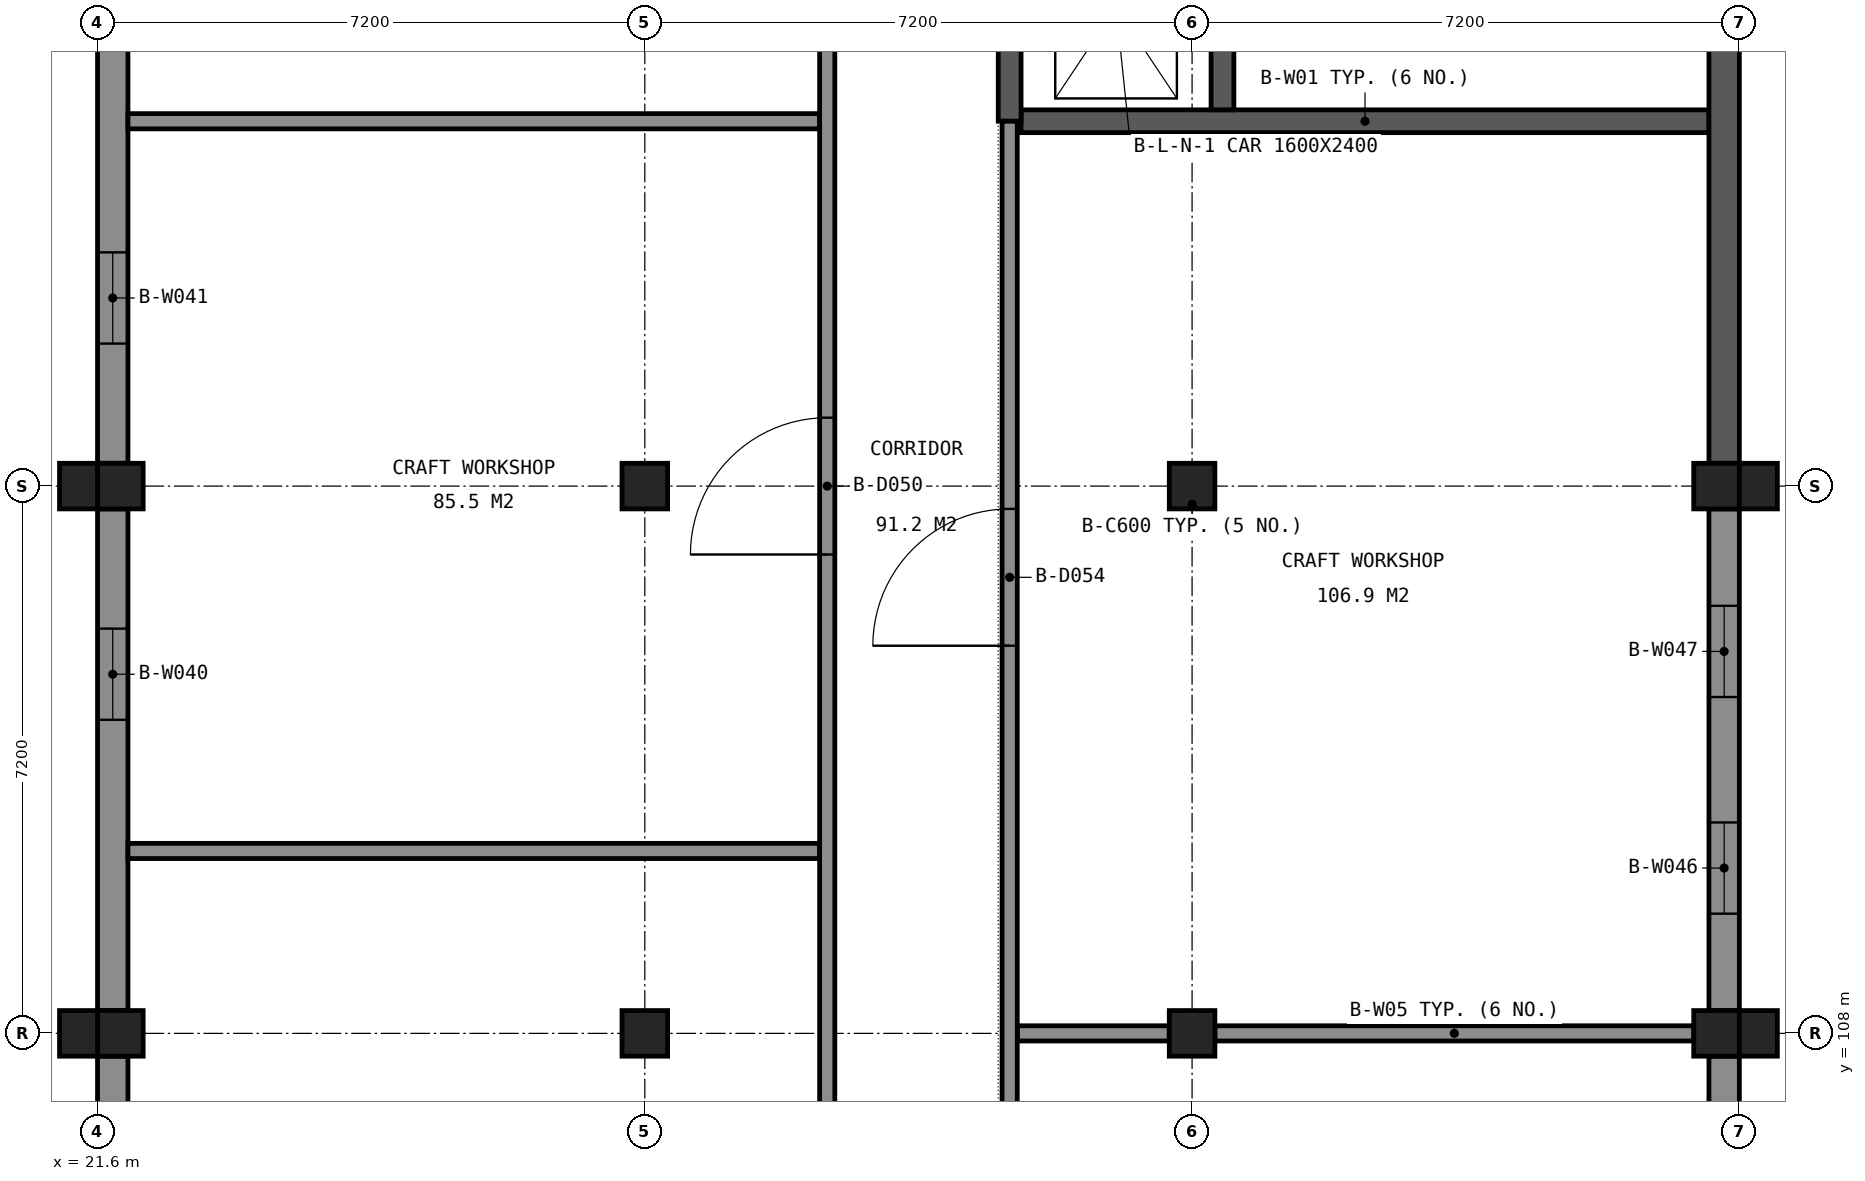
"""IFC4 building model, lengths in metres.
Left out: names, types, materials, properties, quantities, classifications, styles, units other than length and angle.
Written with IfcOpenShell. Run it as: python <this file> out.ifc"""

import sys

from ifc_helpers import new_model, si_unit, direction, frame, frame_2d, origin, origin_2d, place, context, subcontext, project, spatial, rectangle, extrude, element, fill, save


model = new_model("IFC4")
c1 = context("Model", 3, precision=1e-05, world=origin(), true_north=direction((0.0, 1.0)))
c2 = subcontext(c1, "Body", "Model", "MODEL_VIEW")
j1 = project(units=[si_unit("LENGTHUNIT", "METRE"), si_unit("PLANEANGLEUNIT", "RADIAN")], contexts=[c1])
p1 = place(None, origin())
s1 = spatial("IfcSite", under=j1, at=p1, CompositionType="ELEMENT")
p2 = place(p1, origin())
s2 = spatial("IfcBuilding", under=s1, at=p2, CompositionType="ELEMENT")
p3 = place(p2, frame((0.0, 0.0, 9.6)))
s3 = spatial("IfcBuildingStorey", under=s2, at=p3, CompositionType="ELEMENT", Elevation=9.6)
for number, where, z_axis, x_axis in (
    (1, (21.9, 115.2, 0.0), (0.0, 0.0, 1.0), (1.0, 0.0, 0.0)),
    (2, (21.9, 108.0, 0.0), (0.0, 0.0, 1.0), (1.0, 0.0, 0.0)),
    (3, (28.8, 115.2, 0.0), (0.0, 0.0, 1.0), (1.0, 0.0, 0.0)),
    (4, (28.8, 108.0, 0.0), (0.0, 0.0, 1.0), (1.0, 0.0, 0.0)),
    (5, (36.0, 115.2, 0.0), (0.0, 0.0, 1.0), (1.0, 0.0, 0.0)),
    (6, (36.0, 108.0, 0.0), (0.0, 0.0, 1.0), (1.0, 0.0, 0.0)),
    (7, (42.9, 115.2, 0.0), (0.0, 0.0, 1.0), (1.0, 0.0, 0.0)),
    (8, (42.9, 108.0, 0.0), (0.0, 0.0, 1.0), (1.0, 0.0, 0.0)),
):
    element("IfcColumn", number, at=place(p3, frame(where, z_axis=z_axis, x_axis=x_axis)), inside=s3, PredefinedType="COLUMN", context=c2, shape_type="SweptSolid", body=[
        extrude(rectangle(XDim=0.6, YDim=0.6, at=origin_2d()), origin(), (0.0, 0.0, 1.0), 4.8),
    ])
p4 = place(p3, frame((33.75, 120.0, 0.0), z_axis=(0.0, 0.0, 1.0), x_axis=(1.0, 0.0, 0.0)))
e9 = element("IfcWall", 9, at=p4, inside=s3, PredefinedType="SHEAR", context=c2, shape_type="SweptSolid", body=[
    extrude(rectangle(XDim=9.05, YDim=0.3, at=frame_2d((4.525, 0.0))), origin(), (0.0, 0.0, 1.0), 4.55),
])
p5 = place(p3, frame((33.6, 120.0, 0.0), z_axis=(0.0, 0.0, 1.0), x_axis=(0.0, 1.0, 0.0)))
e10 = element("IfcWall", 10, at=p5, inside=s3, PredefinedType="SHEAR", context=c2, shape_type="SweptSolid", body=[
    extrude(rectangle(XDim=9.2, YDim=0.3, at=frame_2d((4.6, 0.0))), origin(), (0.0, 0.0, 1.0), 4.55),
])
p6 = place(p5, frame((4.0, 0.0, 0.0)))
e11 = element("IfcOpeningElement", 11, at=p6, cuts=e10, PredefinedType="OPENING", context=c2, shape_type="SweptSolid", body=[
    extrude(rectangle(XDim=1.2, YDim=2.1, at=frame_2d((0.6, 1.05))), frame((0.0, 0.16, 0.0), z_axis=(0.0, -1.0, 0.0), x_axis=(1.0, 0.0, 0.0)), (0.0, 0.0, 1.0), 0.32),
])
p7 = place(p5, frame((7.45, 0.0, 0.0)))
e12 = element("IfcOpeningElement", 12, at=p7, cuts=e10, PredefinedType="OPENING", context=c2, shape_type="SweptSolid", body=[
    extrude(rectangle(XDim=0.9, YDim=2.1, at=frame_2d((0.45, 1.05))), frame((0.0, 0.16, 0.0), z_axis=(0.0, -1.0, 0.0), x_axis=(1.0, 0.0, 0.0)), (0.0, 0.0, 1.0), 0.32),
])
p8 = place(p3, frame((36.4, 120.15, 0.0), z_axis=(0.0, 0.0, 1.0), x_axis=(0.0, 1.0, 0.0)))
e13 = element("IfcWall", 13, at=p8, inside=s3, PredefinedType="SHEAR", context=c2, shape_type="SweptSolid", body=[
    extrude(rectangle(XDim=2.7, YDim=0.3, at=frame_2d((1.35, 0.0))), origin(), (0.0, 0.0, 1.0), 4.55),
])
p9 = place(p3, frame((43.0, 115.5, 0.0), z_axis=(0.0, 0.0, 1.0), x_axis=(0.0, 1.0, 0.0)))
e14 = element("IfcWall", 14, at=p9, inside=s3, PredefinedType="SHEAR", context=c2, shape_type="SweptSolid", body=[
    extrude(rectangle(XDim=14.1, YDim=0.4, at=frame_2d((7.05, 0.0))), origin(), (0.0, 0.0, 1.0), 4.55),
])
p10 = place(p3, frame((21.8, 101.1, 0.0), z_axis=(0.0, 0.0, 1.0), x_axis=(0.0, 1.0, 0.0)))
e15 = element("IfcWall", 15, at=p10, inside=s3, PredefinedType="SOLIDWALL", context=c2, shape_type="SweptSolid", body=[
    extrude(rectangle(XDim=6.6, YDim=0.4, at=frame_2d((3.3, 0.0))), origin(), (0.0, 0.0, 1.0), 3.95),
])
p11 = place(p10, frame((1.275, 0.0, 0.9)))
e16 = element("IfcOpeningElement", 16, at=p11, cuts=e15, PredefinedType="OPENING", context=c2, shape_type="SweptSolid", body=[
    extrude(rectangle(XDim=1.2, YDim=2.4, at=frame_2d((0.6, 1.2))), frame((0.0, 0.21, 0.0), z_axis=(0.0, -1.0, 0.0), x_axis=(1.0, 0.0, 0.0)), (0.0, 0.0, 1.0), 0.42),
])
p12 = place(p10, frame((4.125, 0.0, 0.9)))
e17 = element("IfcOpeningElement", 17, at=p12, cuts=e15, PredefinedType="OPENING", context=c2, shape_type="SweptSolid", body=[
    extrude(rectangle(XDim=1.2, YDim=2.4, at=frame_2d((0.6, 1.2))), frame((0.0, 0.21, 0.0), z_axis=(0.0, -1.0, 0.0), x_axis=(1.0, 0.0, 0.0)), (0.0, 0.0, 1.0), 0.42),
])
p13 = place(p3, frame((21.8, 108.3, 0.0), z_axis=(0.0, 0.0, 1.0), x_axis=(0.0, 1.0, 0.0)))
e18 = element("IfcWall", 18, at=p13, inside=s3, PredefinedType="SOLIDWALL", context=c2, shape_type="SweptSolid", body=[
    extrude(rectangle(XDim=6.6, YDim=0.4, at=frame_2d((3.3, 0.0))), origin(), (0.0, 0.0, 1.0), 3.95),
])
p14 = place(p13, frame((3.825, 0.0, 0.9)))
e19 = element("IfcOpeningElement", 19, at=p14, cuts=e18, PredefinedType="OPENING", context=c2, shape_type="SweptSolid", body=[
    extrude(rectangle(XDim=1.2, YDim=2.4, at=frame_2d((0.6, 1.2))), frame((0.0, 0.21, 0.0), z_axis=(0.0, -1.0, 0.0), x_axis=(1.0, 0.0, 0.0)), (0.0, 0.0, 1.0), 0.42),
])
p15 = place(p3, frame((21.8, 115.5, 0.0), z_axis=(0.0, 0.0, 1.0), x_axis=(0.0, 1.0, 0.0)))
e20 = element("IfcWall", 20, at=p15, inside=s3, PredefinedType="SOLIDWALL", context=c2, shape_type="SweptSolid", body=[
    extrude(rectangle(XDim=6.6, YDim=0.4, at=frame_2d((3.3, 0.0))), origin(), (0.0, 0.0, 1.0), 3.95),
])
p16 = place(p15, frame((1.575, 0.0, 0.9)))
e21 = element("IfcOpeningElement", 21, at=p16, cuts=e20, PredefinedType="OPENING", context=c2, shape_type="SweptSolid", body=[
    extrude(rectangle(XDim=1.2, YDim=2.4, at=frame_2d((0.6, 1.2))), frame((0.0, 0.21, 0.0), z_axis=(0.0, -1.0, 0.0), x_axis=(1.0, 0.0, 0.0)), (0.0, 0.0, 1.0), 0.42),
])
p17 = place(p3, frame((43.0, 101.1, 0.0), z_axis=(0.0, 0.0, 1.0), x_axis=(0.0, 1.0, 0.0)))
e22 = element("IfcWall", 22, at=p17, inside=s3, PredefinedType="SOLIDWALL", context=c2, shape_type="SweptSolid", body=[
    extrude(rectangle(XDim=6.6, YDim=0.4, at=frame_2d((3.3, 0.0))), origin(), (0.0, 0.0, 1.0), 3.95),
])
p18 = place(p17, frame((1.275, 0.0, 0.9)))
e23 = element("IfcOpeningElement", 23, at=p18, cuts=e22, PredefinedType="OPENING", context=c2, shape_type="SweptSolid", body=[
    extrude(rectangle(XDim=1.2, YDim=2.4, at=frame_2d((0.6, 1.2))), frame((0.0, 0.21, 0.0), z_axis=(0.0, -1.0, 0.0), x_axis=(1.0, 0.0, 0.0)), (0.0, 0.0, 1.0), 0.42),
])
p19 = place(p17, frame((4.125, 0.0, 0.9)))
e24 = element("IfcOpeningElement", 24, at=p19, cuts=e22, PredefinedType="OPENING", context=c2, shape_type="SweptSolid", body=[
    extrude(rectangle(XDim=1.2, YDim=2.4, at=frame_2d((0.6, 1.2))), frame((0.0, 0.21, 0.0), z_axis=(0.0, -1.0, 0.0), x_axis=(1.0, 0.0, 0.0)), (0.0, 0.0, 1.0), 0.42),
])
p20 = place(p3, frame((43.0, 108.3, 0.0), z_axis=(0.0, 0.0, 1.0), x_axis=(0.0, 1.0, 0.0)))
e25 = element("IfcWall", 25, at=p20, inside=s3, PredefinedType="SOLIDWALL", context=c2, shape_type="SweptSolid", body=[
    extrude(rectangle(XDim=6.6, YDim=0.4, at=frame_2d((3.3, 0.0))), origin(), (0.0, 0.0, 1.0), 3.95),
])
p21 = place(p20, frame((1.275, 0.0, 0.9)))
e26 = element("IfcOpeningElement", 26, at=p21, cuts=e25, PredefinedType="OPENING", context=c2, shape_type="SweptSolid", body=[
    extrude(rectangle(XDim=1.2, YDim=2.4, at=frame_2d((0.6, 1.2))), frame((0.0, 0.21, 0.0), z_axis=(0.0, -1.0, 0.0), x_axis=(1.0, 0.0, 0.0)), (0.0, 0.0, 1.0), 0.42),
])
p22 = place(p20, frame((4.125, 0.0, 0.9)))
e27 = element("IfcOpeningElement", 27, at=p22, cuts=e25, PredefinedType="OPENING", context=c2, shape_type="SweptSolid", body=[
    extrude(rectangle(XDim=1.2, YDim=2.4, at=frame_2d((0.6, 1.2))), frame((0.0, 0.21, 0.0), z_axis=(0.0, -1.0, 0.0), x_axis=(1.0, 0.0, 0.0)), (0.0, 0.0, 1.0), 0.42),
])
for number, where, z_axis, x_axis in (
    (28, (21.35, 108.0, 0.0), (0.0, 0.0, 1.0), (1.0, 0.0, 0.0)),
    (29, (21.35, 115.2, 0.0), (0.0, 0.0, 1.0), (1.0, 0.0, 0.0)),
):
    element("IfcColumn", number, at=place(p3, frame(where, z_axis=z_axis, x_axis=x_axis)), inside=s3, PredefinedType="COLUMN", context=c2, shape_type="SweptSolid", body=[
        extrude(rectangle(XDim=0.5, YDim=0.6, at=origin_2d()), origin(), (0.0, 0.0, 1.0), 4.8),
    ])
for number, where, z_axis, x_axis in (
    (30, (21.525, 101.1, -0.15), (0.0, 0.0, 1.0), (0.0, 1.0, 0.0)),
    (31, (21.525, 108.3, -0.15), (0.0, 0.0, 1.0), (0.0, 1.0, 0.0)),
):
    element("IfcWall", number, at=place(p3, frame(where, z_axis=z_axis, x_axis=x_axis)), inside=s3, PredefinedType="SOLIDWALL", context=c2, shape_type="SweptSolid", body=[
        extrude(rectangle(XDim=6.6, YDim=0.15, at=frame_2d((3.3, 0.0))), origin(), (0.0, 0.0, 1.0), 0.3),
    ])
p23 = place(p3, frame((21.525, 115.5, -0.15), z_axis=(0.0, 0.0, 1.0), x_axis=(0.0, 1.0, 0.0)))
e32 = element("IfcWall", 32, at=p23, inside=s3, PredefinedType="SOLIDWALL", context=c2, shape_type="SweptSolid", body=[
    extrude(rectangle(XDim=6.6, YDim=0.15, at=frame_2d((3.3, 0.0))), origin(), (0.0, 0.0, 1.0), 0.3),
])
for number, where, z_axis, x_axis in (
    (33, (43.45, 108.0, 0.0), (0.0, 0.0, 1.0), (1.0, 0.0, 0.0)),
    (34, (43.45, 115.2, 0.0), (0.0, 0.0, 1.0), (1.0, 0.0, 0.0)),
):
    element("IfcColumn", number, at=place(p3, frame(where, z_axis=z_axis, x_axis=x_axis)), inside=s3, PredefinedType="COLUMN", context=c2, shape_type="SweptSolid", body=[
        extrude(rectangle(XDim=0.5, YDim=0.6, at=origin_2d()), origin(), (0.0, 0.0, 1.0), 4.8),
    ])
for number, where, z_axis, x_axis in (
    (35, (43.275, 101.1, -0.15), (0.0, 0.0, 1.0), (0.0, 1.0, 0.0)),
    (36, (43.275, 108.3, -0.15), (0.0, 0.0, 1.0), (0.0, 1.0, 0.0)),
):
    element("IfcWall", number, at=place(p3, frame(where, z_axis=z_axis, x_axis=x_axis)), inside=s3, PredefinedType="SOLIDWALL", context=c2, shape_type="SweptSolid", body=[
        extrude(rectangle(XDim=6.6, YDim=0.15, at=frame_2d((3.3, 0.0))), origin(), (0.0, 0.0, 1.0), 0.3),
    ])
p24 = place(p3, frame((43.275, 115.5, -0.15), z_axis=(0.0, 0.0, 1.0), x_axis=(0.0, 1.0, 0.0)))
e37 = element("IfcWall", 37, at=p24, inside=s3, PredefinedType="SOLIDWALL", context=c2, shape_type="SweptSolid", body=[
    extrude(rectangle(XDim=6.6, YDim=0.15, at=frame_2d((3.3, 0.0))), origin(), (0.0, 0.0, 1.0), 0.3),
])
p25 = place(p3, frame((33.7, 108.0, 0.0), z_axis=(0.0, 0.0, 1.0), x_axis=(1.0, 0.0, 0.0)))
e38 = element("IfcWall", 38, at=p25, inside=s3, PredefinedType="PARTITIONING", context=c2, shape_type="SweptSolid", body=[
    extrude(rectangle(XDim=2.0, YDim=0.2, at=frame_2d((1.0, 0.0))), origin(), (0.0, 0.0, 1.0), 3.95),
])
p26 = place(p3, frame((36.3, 108.0, 0.0), z_axis=(0.0, 0.0, 1.0), x_axis=(1.0, 0.0, 0.0)))
e39 = element("IfcWall", 39, at=p26, inside=s3, PredefinedType="PARTITIONING", context=c2, shape_type="SweptSolid", body=[
    extrude(rectangle(XDim=6.3, YDim=0.2, at=frame_2d((3.15, 0.0))), origin(), (0.0, 0.0, 1.0), 3.95),
])
for number, where, z_axis, x_axis in (
    (40, (22.0, 110.4, 0.0), (0.0, 0.0, 1.0), (1.0, 0.0, 0.0)),
    (41, (22.0, 120.0, 0.0), (0.0, 0.0, 1.0), (1.0, 0.0, 0.0)),
):
    element("IfcWall", number, at=place(p3, frame(where, z_axis=z_axis, x_axis=x_axis)), inside=s3, PredefinedType="PARTITIONING", context=c2, shape_type="SweptSolid", body=[
        extrude(rectangle(XDim=9.1, YDim=0.2, at=frame_2d((4.55, 0.0))), origin(), (0.0, 0.0, 1.0), 3.95),
    ])
p27 = place(p3, frame((31.2, 86.8, 0.0), z_axis=(0.0, 0.0, 1.0), x_axis=(0.0, 1.0, 0.0)))
e42 = element("IfcWall", 42, at=p27, inside=s3, PredefinedType="PARTITIONING", context=c2, shape_type="SweptSolid", body=[
    extrude(rectangle(XDim=42.4, YDim=0.2, at=frame_2d((21.2, 0.0))), origin(), (0.0, 0.0, 1.0), 3.95),
])
p28 = place(p27, frame((37.1, 0.0, 0.0)))
e43 = element("IfcOpeningElement", 43, at=p28, cuts=e42, PredefinedType="OPENING", context=c2, shape_type="SweptSolid", body=[
    extrude(rectangle(XDim=1.8, YDim=2.1, at=frame_2d((0.9, 1.05))), frame((0.0, 0.11, 0.0), z_axis=(0.0, -1.0, 0.0), x_axis=(1.0, 0.0, 0.0)), (0.0, 0.0, 1.0), 0.22),
])
p29 = place(p27, frame((27.5, 0.0, 0.0)))
e44 = element("IfcOpeningElement", 44, at=p29, cuts=e42, PredefinedType="OPENING", context=c2, shape_type="SweptSolid", body=[
    extrude(rectangle(XDim=1.8, YDim=2.1, at=frame_2d((0.9, 1.05))), frame((0.0, 0.11, 0.0), z_axis=(0.0, -1.0, 0.0), x_axis=(1.0, 0.0, 0.0)), (0.0, 0.0, 1.0), 0.22),
])
p30 = place(p27, frame((17.9, 0.0, 0.0)))
e45 = element("IfcOpeningElement", 45, at=p30, cuts=e42, PredefinedType="OPENING", context=c2, shape_type="SweptSolid", body=[
    extrude(rectangle(XDim=1.8, YDim=2.1, at=frame_2d((0.9, 1.05))), frame((0.0, 0.11, 0.0), z_axis=(0.0, -1.0, 0.0), x_axis=(1.0, 0.0, 0.0)), (0.0, 0.0, 1.0), 0.22),
])
p31 = place(p27, frame((9.9, 0.0, 0.0)))
e46 = element("IfcOpeningElement", 46, at=p31, cuts=e42, PredefinedType="OPENING", context=c2, shape_type="SweptSolid", body=[
    extrude(rectangle(XDim=1.0, YDim=2.1, at=frame_2d((0.5, 1.05))), frame((0.0, 0.11, 0.0), z_axis=(0.0, -1.0, 0.0), x_axis=(1.0, 0.0, 0.0)), (0.0, 0.0, 1.0), 0.22),
])
p32 = place(p27, frame((2.7, 0.0, 0.0)))
e47 = element("IfcOpeningElement", 47, at=p32, cuts=e42, PredefinedType="OPENING", context=c2, shape_type="SweptSolid", body=[
    extrude(rectangle(XDim=1.0, YDim=2.1, at=frame_2d((0.5, 1.05))), frame((0.0, 0.11, 0.0), z_axis=(0.0, -1.0, 0.0), x_axis=(1.0, 0.0, 0.0)), (0.0, 0.0, 1.0), 0.22),
])
p33 = place(p3, frame((33.6, 96.0, 0.0), z_axis=(0.0, 0.0, 1.0), x_axis=(0.0, 1.0, 0.0)))
e48 = element("IfcWall", 48, at=p33, inside=s3, PredefinedType="PARTITIONING", context=c2, shape_type="SweptSolid", body=[
    extrude(rectangle(XDim=24.0, YDim=0.2, at=frame_2d((12.0, 0.0))), origin(), (0.0, 0.0, 1.0), 3.95),
])
p34 = place(p33, frame((17.1, 0.0, 0.0)))
e49 = element("IfcOpeningElement", 49, at=p34, cuts=e48, PredefinedType="OPENING", context=c2, shape_type="SweptSolid", body=[
    extrude(rectangle(XDim=1.8, YDim=2.1, at=frame_2d((0.9, 1.05))), frame((0.0, 0.11, 0.0), z_axis=(0.0, -1.0, 0.0), x_axis=(1.0, 0.0, 0.0)), (0.0, 0.0, 1.0), 0.22),
])
p35 = place(p33, frame((7.9, 0.0, 0.0)))
e50 = element("IfcOpeningElement", 50, at=p35, cuts=e48, PredefinedType="OPENING", context=c2, shape_type="SweptSolid", body=[
    extrude(rectangle(XDim=1.0, YDim=2.1, at=frame_2d((0.5, 1.05))), frame((0.0, 0.11, 0.0), z_axis=(0.0, -1.0, 0.0), x_axis=(1.0, 0.0, 0.0)), (0.0, 0.0, 1.0), 0.22),
])
p36 = place(p33, frame((1.9, 0.0, 0.0)))
e51 = element("IfcOpeningElement", 51, at=p36, cuts=e48, PredefinedType="OPENING", context=c2, shape_type="SweptSolid", body=[
    extrude(rectangle(XDim=1.0, YDim=2.1, at=frame_2d((0.5, 1.05))), frame((0.0, 0.11, 0.0), z_axis=(0.0, -1.0, 0.0), x_axis=(1.0, 0.0, 0.0)), (0.0, 0.0, 1.0), 0.22),
])
p37 = place(p14, origin())
e52 = element("IfcWindow", 52, at=p37, inside=s3, PartitioningType="SINGLE_PANEL", PredefinedType="WINDOW", context=c2, shape_type="SweptSolid", body=[
    extrude(rectangle(XDim=1.2, YDim=2.4, at=frame_2d((0.6, 1.2))), frame((0.0, 0.03, 0.0), z_axis=(0.0, -1.0, 0.0), x_axis=(1.0, 0.0, 0.0)), (0.0, 0.0, 1.0), 0.06),
])
fill(e19, e52)
p38 = place(p16, origin())
e53 = element("IfcWindow", 53, at=p38, inside=s3, PartitioningType="SINGLE_PANEL", PredefinedType="WINDOW", context=c2, shape_type="SweptSolid", body=[
    extrude(rectangle(XDim=1.2, YDim=2.4, at=frame_2d((0.6, 1.2))), frame((0.0, 0.03, 0.0), z_axis=(0.0, -1.0, 0.0), x_axis=(1.0, 0.0, 0.0)), (0.0, 0.0, 1.0), 0.06),
])
fill(e21, e53)
p39 = place(p21, origin())
e54 = element("IfcWindow", 54, at=p39, inside=s3, PartitioningType="SINGLE_PANEL", PredefinedType="WINDOW", context=c2, shape_type="SweptSolid", body=[
    extrude(rectangle(XDim=1.2, YDim=2.4, at=frame_2d((0.6, 1.2))), frame((0.0, 0.03, 0.0), z_axis=(0.0, -1.0, 0.0), x_axis=(1.0, 0.0, 0.0)), (0.0, 0.0, 1.0), 0.06),
])
fill(e26, e54)
p40 = place(p22, origin())
e55 = element("IfcWindow", 55, at=p40, inside=s3, PartitioningType="SINGLE_PANEL", PredefinedType="WINDOW", context=c2, shape_type="SweptSolid", body=[
    extrude(rectangle(XDim=1.2, YDim=2.4, at=frame_2d((0.6, 1.2))), frame((0.0, 0.03, 0.0), z_axis=(0.0, -1.0, 0.0), x_axis=(1.0, 0.0, 0.0)), (0.0, 0.0, 1.0), 0.06),
])
fill(e27, e55)
p41 = place(p29, origin())
e56 = element("IfcDoor", 56, at=p41, inside=s3, OperationType="DOUBLE_DOOR_DOUBLE_SWING", PredefinedType="DOOR", context=c2, shape_type="SweptSolid", body=[
    extrude(rectangle(XDim=1.8, YDim=2.1, at=frame_2d((0.9, 1.05))), frame((0.0, 0.025, 0.0), z_axis=(0.0, -1.0, 0.0), x_axis=(1.0, 0.0, 0.0)), (0.0, 0.0, 1.0), 0.05),
])
fill(e44, e56)
p42 = place(p34, origin())
e57 = element("IfcDoor", 57, at=p42, inside=s3, OperationType="DOUBLE_DOOR_DOUBLE_SWING", PredefinedType="DOOR", context=c2, shape_type="SweptSolid", body=[
    extrude(rectangle(XDim=1.8, YDim=2.1, at=frame_2d((0.9, 1.05))), frame((0.0, 0.025, 0.0), z_axis=(0.0, -1.0, 0.0), x_axis=(1.0, 0.0, 0.0)), (0.0, 0.0, 1.0), 0.05),
])
fill(e49, e57)
save(model, sys.argv[1])
